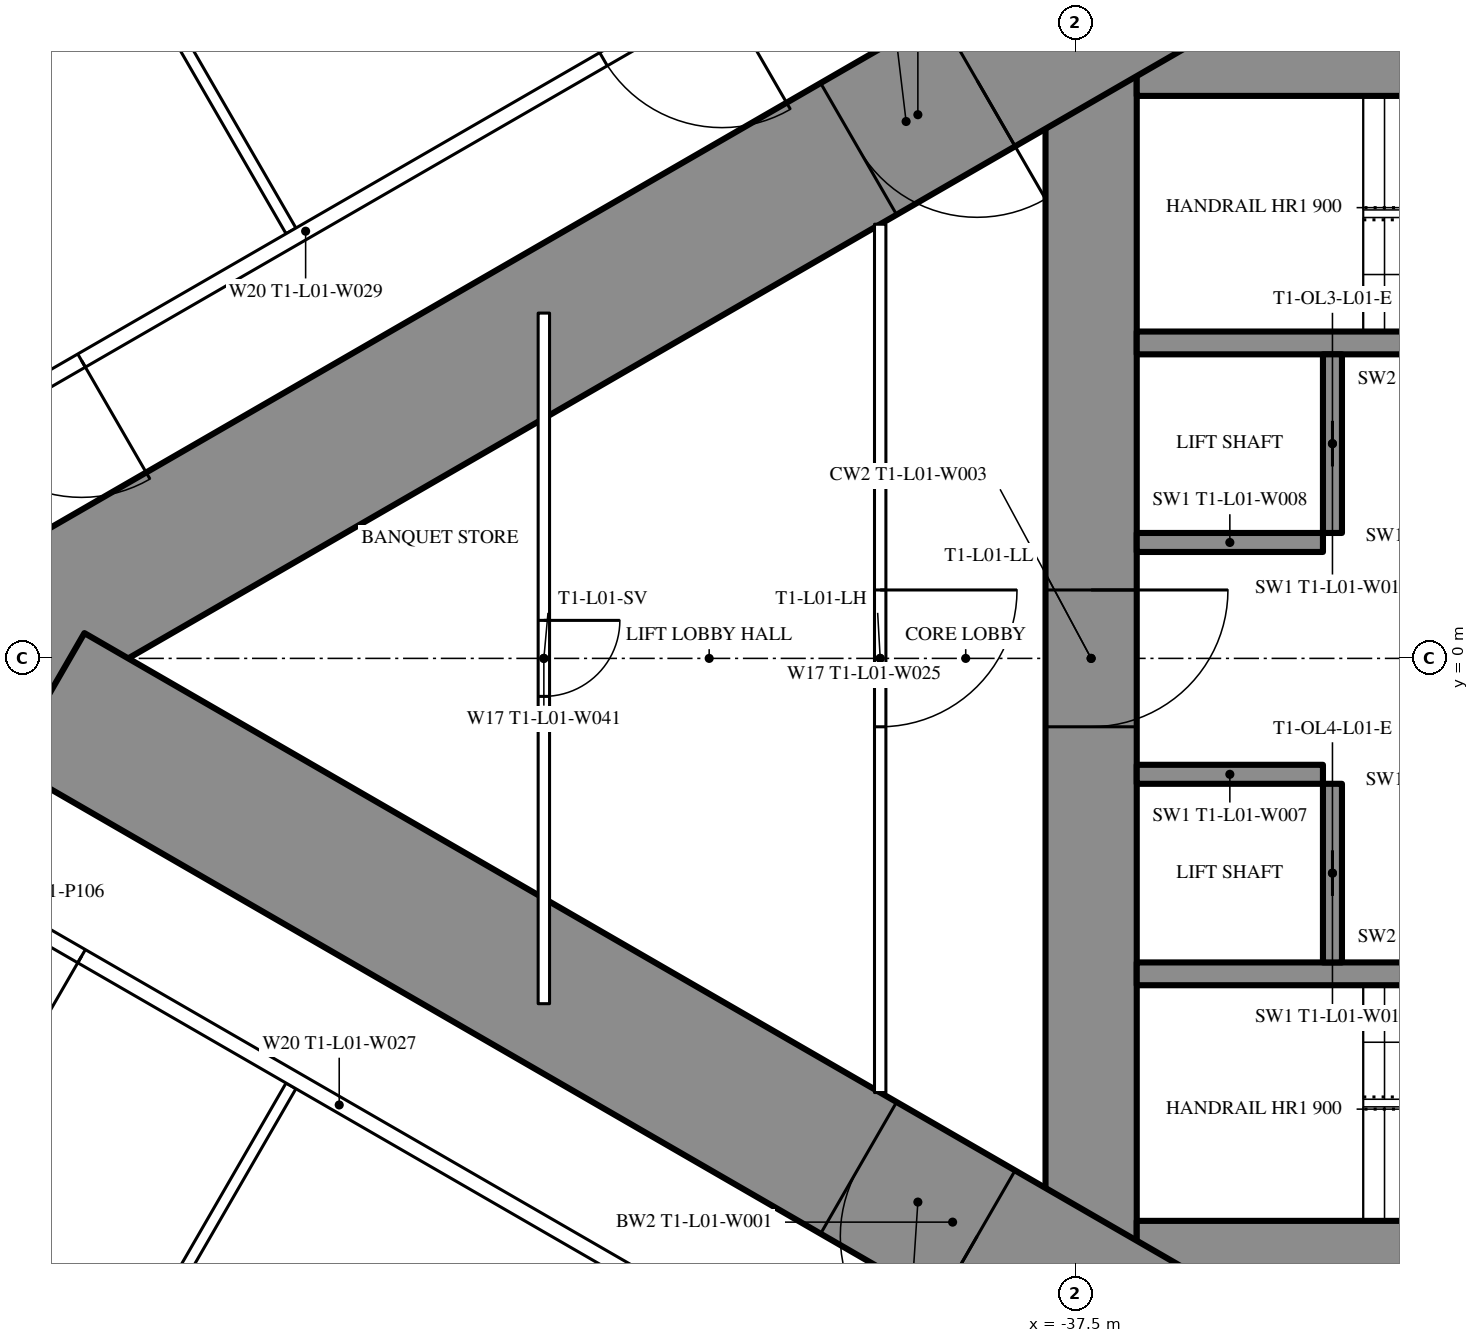
"""IFC4 building model, lengths in metres.
Left out: names, types, materials, properties, quantities, classifications, styles, units other than length and angle.
Written with IfcOpenShell. Run it as: python <this file> out.ifc"""

import sys

from ifc_helpers import new_model, si_unit, direction, frame, frame_2d, origin, place, context, subcontext, project, spatial, rectangle, extrude, element, fill, save


model = new_model("IFC4")
c1 = context("Model", 3, precision=1e-05, world=origin(), true_north=direction((0.0, 1.0)))
c2 = subcontext(c1, "Body", "Model", "MODEL_VIEW")
j1 = project(units=[si_unit("LENGTHUNIT", "METRE"), si_unit("PLANEANGLEUNIT", "RADIAN")], contexts=[c1])
p1 = place(None, origin())
s1 = spatial("IfcSite", under=j1, at=p1, CompositionType="ELEMENT")
p2 = place(p1, origin())
s2 = spatial("IfcBuilding", under=s1, at=p2, CompositionType="ELEMENT")
p3 = place(p2, frame((0.0, 0.0, 7.2)))
s3 = spatial("IfcBuildingStorey", under=s2, at=p3, CompositionType="ELEMENT", Elevation=7.2)
p4 = place(p3, frame((-37.3, 8.6, 0.0), z_axis=(0.0, 0.0, 1.0), x_axis=(0.0, -1.0, 0.0)))
e1 = element("IfcWall", 1, at=p4, inside=s3, PredefinedType="SHEAR", context=c2, shape_type="SweptSolid", body=[
    extrude(rectangle(XDim=17.2, YDim=1.2, at=frame_2d((8.6, 0.0))), origin(), (0.0, 0.0, 1.0), 5.4),
])
p5 = place(p4, frame((7.7, 0.0, 0.0)))
e2 = element("IfcOpeningElement", 2, at=p5, cuts=e1, PredefinedType="OPENING", context=c2, shape_type="SweptSolid", body=[
    extrude(rectangle(XDim=1.8, YDim=2.2, at=frame_2d((0.9, 1.1))), frame((0.0, 0.61, 0.0), z_axis=(0.0, -1.0, 0.0), x_axis=(1.0, 0.0, 0.0)), (0.0, 0.0, 1.0), 1.22),
])
p6 = place(p3, frame((-28.3, 8.0, 0.0), z_axis=(0.0, 0.0, 1.0), x_axis=(-1.0, 0.0, 0.0)))
e3 = element("IfcWall", 3, at=p6, inside=s3, PredefinedType="SHEAR", context=c2, shape_type="SweptSolid", body=[
    extrude(rectangle(XDim=8.4, YDim=1.2, at=frame_2d((4.2, 0.0))), origin(), (0.0, 0.0, 1.0), 5.4),
])
p7 = place(p6, frame((0.25, 0.0, 0.0)))
e4 = element("IfcOpeningElement", 4, at=p7, cuts=e3, PredefinedType="OPENING", context=c2, shape_type="SweptSolid", body=[
    extrude(rectangle(XDim=1.0, YDim=2.2, at=frame_2d((0.5, 1.1))), frame((0.0, 0.61, 0.0), z_axis=(0.0, -1.0, 0.0), x_axis=(1.0, 0.0, 0.0)), (0.0, 0.0, 1.0), 1.22),
])
p8 = place(p3, frame((-28.3, -8.0, 0.0), z_axis=(0.0, 0.0, 1.0), x_axis=(-1.0, 0.0, 0.0)))
e5 = element("IfcWall", 5, at=p8, inside=s3, PredefinedType="SHEAR", context=c2, shape_type="SweptSolid", body=[
    extrude(rectangle(XDim=8.4, YDim=1.2, at=frame_2d((4.2, 0.0))), origin(), (0.0, 0.0, 1.0), 5.4),
])
p9 = place(p8, frame((0.25, 0.0, 0.0)))
e6 = element("IfcOpeningElement", 6, at=p9, cuts=e5, PredefinedType="OPENING", context=c2, shape_type="SweptSolid", body=[
    extrude(rectangle(XDim=1.0, YDim=2.2, at=frame_2d((0.5, 1.1))), frame((0.0, 0.61, 0.0), z_axis=(0.0, -1.0, 0.0), x_axis=(1.0, 0.0, 0.0)), (0.0, 0.0, 1.0), 1.22),
])
for number, where, z_axis, x_axis in (
    (7, (-28.3, 4.15, 0.0), (0.0, 0.0, 1.0), (-1.0, 0.0, 0.0)),
    (8, (-28.3, -4.15, 0.0), (0.0, 0.0, 1.0), (-1.0, 0.0, 0.0)),
):
    element("IfcWall", number, at=place(p3, frame(where, z_axis=z_axis, x_axis=x_axis)), inside=s3, PredefinedType="SHEAR", context=c2, shape_type="SweptSolid", body=[
        extrude(rectangle(XDim=8.4, YDim=0.3, at=frame_2d((4.2, 0.0))), origin(), (0.0, 0.0, 1.0), 5.4),
    ])
p10 = place(p3, frame((-34.125, 4.0, 0.0), z_axis=(0.0, 0.0, 1.0), x_axis=(0.0, -1.0, 0.0)))
e9 = element("IfcWall", 9, at=p10, inside=s3, PredefinedType="SHEAR", context=c2, shape_type="SweptSolid", body=[
    extrude(rectangle(XDim=2.35, YDim=0.25, at=frame_2d((1.175, 0.0))), origin(), (0.0, 0.0, 1.0), 5.4),
])
p11 = place(p10, frame((0.875, 0.0, 0.0)))
e10 = element("IfcOpeningElement", 10, at=p11, cuts=e9, PredefinedType="OPENING", context=c2, shape_type="SweptSolid", body=[
    extrude(rectangle(XDim=0.6, YDim=2.0, at=frame_2d((0.3, 1.0))), frame((0.0, 0.135, 0.0), z_axis=(0.0, -1.0, 0.0), x_axis=(1.0, 0.0, 0.0)), (0.0, 0.0, 1.0), 0.27),
])
p12 = place(p3, frame((-34.25, 1.525, 0.0), z_axis=(0.0, 0.0, 1.0), x_axis=(-1.0, 0.0, 0.0)))
e11 = element("IfcWall", 11, at=p12, inside=s3, PredefinedType="SHEAR", context=c2, shape_type="SweptSolid", body=[
    extrude(rectangle(XDim=2.45, YDim=0.25, at=frame_2d((1.225, 0.0))), origin(), (0.0, 0.0, 1.0), 5.4),
])
p13 = place(p3, frame((-34.125, -1.65, 0.0), z_axis=(0.0, 0.0, 1.0), x_axis=(0.0, -1.0, 0.0)))
e12 = element("IfcWall", 12, at=p13, inside=s3, PredefinedType="SHEAR", context=c2, shape_type="SweptSolid", body=[
    extrude(rectangle(XDim=2.35, YDim=0.25, at=frame_2d((1.175, 0.0))), origin(), (0.0, 0.0, 1.0), 5.4),
])
p14 = place(p13, frame((0.875, 0.0, 0.0)))
e13 = element("IfcOpeningElement", 13, at=p14, cuts=e12, PredefinedType="OPENING", context=c2, shape_type="SweptSolid", body=[
    extrude(rectangle(XDim=0.6, YDim=2.0, at=frame_2d((0.3, 1.0))), frame((0.0, 0.135, 0.0), z_axis=(0.0, -1.0, 0.0), x_axis=(1.0, 0.0, 0.0)), (0.0, 0.0, 1.0), 0.27),
])
p15 = place(p3, frame((-34.25, -1.525, 0.0), z_axis=(0.0, 0.0, 1.0), x_axis=(-1.0, 0.0, 0.0)))
e14 = element("IfcWall", 14, at=p15, inside=s3, PredefinedType="SHEAR", context=c2, shape_type="SweptSolid", body=[
    extrude(rectangle(XDim=2.45, YDim=0.25, at=frame_2d((1.225, 0.0))), origin(), (0.0, 0.0, 1.0), 5.4),
])
p16 = place(p3, frame((-27.2, 14.3, 0.0), z_axis=(0.0, 0.0, 1.0), x_axis=(-0.866026593062, -0.499997940104, 0.0)))
e15 = element("IfcWall", 15, at=p16, inside=s3, PredefinedType="SHEAR", context=c2, shape_type="SweptSolid", body=[
    extrude(rectangle(XDim=28.946, YDim=2.0, at=frame_2d((14.473, 0.0))), origin(), (0.0, 0.0, 1.0), 5.4),
])
p17 = place(p16, frame((4.6, 0.0, 0.0)))
e16 = element("IfcOpeningElement", 16, at=p17, cuts=e15, PredefinedType="OPENING", context=c2, shape_type="SweptSolid", body=[
    extrude(rectangle(XDim=1.0, YDim=2.2, at=frame_2d((0.5, 1.1))), frame((0.0, 1.01, 0.0), z_axis=(0.0, -1.0, 0.0), x_axis=(1.0, 0.0, 0.0)), (0.0, 0.0, 1.0), 2.02),
])
p18 = place(p16, frame((13.395, 0.0, 0.0)))
e17 = element("IfcOpeningElement", 17, at=p18, cuts=e15, PredefinedType="OPENING", context=c2, shape_type="SweptSolid", body=[
    extrude(rectangle(XDim=1.8, YDim=2.2, at=frame_2d((0.9, 1.1))), frame((0.0, 1.01, 0.0), z_axis=(0.0, -1.0, 0.0), x_axis=(1.0, 0.0, 0.0)), (0.0, 0.0, 1.0), 2.02),
])
p19 = place(p3, frame((-27.2, -14.3, 0.0), z_axis=(0.0, 0.0, 1.0), x_axis=(-0.866024044937, 0.500002353585, 0.0)))
e18 = element("IfcWall", 18, at=p19, inside=s3, PredefinedType="SHEAR", context=c2, shape_type="SweptSolid", body=[
    extrude(rectangle(XDim=27.533, YDim=2.0, at=frame_2d((13.767, 0.0))), origin(), (0.0, 0.0, 1.0), 5.4),
])
p20 = place(p19, frame((4.6, 0.0, 0.0)))
e19 = element("IfcOpeningElement", 19, at=p20, cuts=e18, PredefinedType="OPENING", context=c2, shape_type="SweptSolid", body=[
    extrude(rectangle(XDim=1.0, YDim=2.2, at=frame_2d((0.5, 1.1))), frame((0.0, 1.01, 0.0), z_axis=(0.0, -1.0, 0.0), x_axis=(1.0, 0.0, 0.0)), (0.0, 0.0, 1.0), 2.02),
])
p21 = place(p19, frame((13.395, 0.0, 0.0)))
e20 = element("IfcOpeningElement", 20, at=p21, cuts=e18, PredefinedType="OPENING", context=c2, shape_type="SweptSolid", body=[
    extrude(rectangle(XDim=1.8, YDim=2.2, at=frame_2d((0.9, 1.1))), frame((0.0, 1.01, 0.0), z_axis=(0.0, -1.0, 0.0), x_axis=(1.0, 0.0, 0.0)), (0.0, 0.0, 1.0), 2.02),
])
for number, where, z_axis, x_axis in (
    (21, (-47.827, 5.624, 0.0), (0.0, 0.0, 1.0), (-0.5, 0.866, 0.0)),
    (22, (-47.827, -5.624, 0.0), (0.0, 0.0, 1.0), (-0.5, -0.866, 0.0)),
):
    element("IfcWall", number, at=place(p3, frame(where, z_axis=z_axis, x_axis=x_axis)), inside=s3, PredefinedType="PARTITIONING", context=c2, shape_type="SweptSolid", body=[
        extrude(rectangle(XDim=9.11, YDim=0.15, at=frame_2d((4.555, 0.0))), origin(), (0.0, 0.0, 1.0), 4.05),
    ])
p22 = place(p3, frame((-37.9, 11.24, 0.0), z_axis=(0.0, 0.0, 1.0), x_axis=(-0.866022995118, -0.50000417191, 0.0)))
e23 = element("IfcWall", 23, at=p22, inside=s3, PredefinedType="PARTITIONING", context=c2, shape_type="SweptSolid", body=[
    extrude(rectangle(XDim=22.48, YDim=0.2, at=frame_2d((11.24, 0.0))), origin(), (0.0, 0.0, 1.0), 5.05),
])
p23 = place(p22, frame((14.644, 0.0, 0.0)))
e24 = element("IfcOpeningElement", 24, at=p23, cuts=e23, PredefinedType="OPENING", context=c2, shape_type="SweptSolid", body=[
    extrude(rectangle(XDim=1.8, YDim=2.2, at=frame_2d((0.9, 1.1))), frame((0.0, 0.11, 0.0), z_axis=(0.0, -1.0, 0.0), x_axis=(1.0, 0.0, 0.0)), (0.0, 0.0, 1.0), 0.22),
])
p24 = place(p22, frame((20.069, 0.0, 0.0)))
e25 = element("IfcOpeningElement", 25, at=p24, cuts=e23, PredefinedType="OPENING", context=c2, shape_type="SweptSolid", body=[
    extrude(rectangle(XDim=1.8, YDim=2.2, at=frame_2d((0.9, 1.1))), frame((0.0, 0.11, 0.0), z_axis=(0.0, -1.0, 0.0), x_axis=(1.0, 0.0, 0.0)), (0.0, 0.0, 1.0), 0.22),
])
p25 = place(p22, frame((4.915, 0.0, 0.0)))
e26 = element("IfcOpeningElement", 26, at=p25, cuts=e23, PredefinedType="OPENING", context=c2, shape_type="SweptSolid", body=[
    extrude(rectangle(XDim=1.8, YDim=2.2, at=frame_2d((0.9, 1.1))), frame((0.0, 0.11, 0.0), z_axis=(0.0, -1.0, 0.0), x_axis=(1.0, 0.0, 0.0)), (0.0, 0.0, 1.0), 0.22),
])
p26 = place(p3, frame((-37.12, -11.69, 0.0), z_axis=(0.0, 0.0, 1.0), x_axis=(-0.866028803602, 0.499994111297, 0.0)))
e27 = element("IfcWall", 27, at=p26, inside=s3, PredefinedType="PARTITIONING", context=c2, shape_type="SweptSolid", body=[
    extrude(rectangle(XDim=23.26, YDim=0.2, at=frame_2d((11.63, 0.0))), origin(), (0.0, 0.0, 1.0), 5.05),
])
p27 = place(p26, frame((20.909, 0.0, 0.0)))
e28 = element("IfcOpeningElement", 28, at=p27, cuts=e27, PredefinedType="OPENING", context=c2, shape_type="SweptSolid", body=[
    extrude(rectangle(XDim=1.8, YDim=2.2, at=frame_2d((0.9, 1.1))), frame((0.0, 0.11, 0.0), z_axis=(0.0, -1.0, 0.0), x_axis=(1.0, 0.0, 0.0)), (0.0, 0.0, 1.0), 0.22),
])
p28 = place(p26, frame((15.544, 0.0, 0.0)))
e29 = element("IfcOpeningElement", 29, at=p28, cuts=e27, PredefinedType="OPENING", context=c2, shape_type="SweptSolid", body=[
    extrude(rectangle(XDim=1.8, YDim=2.2, at=frame_2d((0.9, 1.1))), frame((0.0, 0.11, 0.0), z_axis=(0.0, -1.0, 0.0), x_axis=(1.0, 0.0, 0.0)), (0.0, 0.0, 1.0), 0.22),
])
p29 = place(p26, frame((5.365, 0.0, 0.0)))
e30 = element("IfcOpeningElement", 30, at=p29, cuts=e27, PredefinedType="OPENING", context=c2, shape_type="SweptSolid", body=[
    extrude(rectangle(XDim=1.8, YDim=2.2, at=frame_2d((0.9, 1.1))), frame((0.0, 0.11, 0.0), z_axis=(0.0, -1.0, 0.0), x_axis=(1.0, 0.0, 0.0)), (0.0, 0.0, 1.0), 0.22),
])
p30 = place(p3, frame((-40.075, 5.712, 0.0), z_axis=(0.0, 0.0, 1.0), x_axis=(0.0, -1.0, 0.0)))
e31 = element("IfcWall", 31, at=p30, inside=s3, PredefinedType="PARTITIONING", context=c2, shape_type="SweptSolid", body=[
    extrude(rectangle(XDim=11.424, YDim=0.15, at=frame_2d((5.712, 0.0))), origin(), (0.0, 0.0, 1.0), 5.05),
])
p31 = place(p30, frame((4.812, 0.0, 0.0)))
e32 = element("IfcOpeningElement", 32, at=p31, cuts=e31, PredefinedType="OPENING", context=c2, shape_type="SweptSolid", body=[
    extrude(rectangle(XDim=1.8, YDim=2.2, at=frame_2d((0.9, 1.1))), frame((0.0, 0.085, 0.0), z_axis=(0.0, -1.0, 0.0), x_axis=(1.0, 0.0, 0.0)), (0.0, 0.0, 1.0), 0.17),
])
p32 = place(p3, frame((-44.5, 4.543, 0.0), z_axis=(0.0, 0.0, 1.0), x_axis=(0.0, -1.0, 0.0)))
e33 = element("IfcWall", 33, at=p32, inside=s3, PredefinedType="PARTITIONING", context=c2, shape_type="SweptSolid", body=[
    extrude(rectangle(XDim=9.085, YDim=0.15, at=frame_2d((4.543, 0.0))), origin(), (0.0, 0.0, 1.0), 5.05),
])
p33 = place(p32, frame((4.043, 0.0, 0.0)))
e34 = element("IfcOpeningElement", 34, at=p33, cuts=e33, PredefinedType="OPENING", context=c2, shape_type="SweptSolid", body=[
    extrude(rectangle(XDim=1.0, YDim=2.2, at=frame_2d((0.5, 1.1))), frame((0.0, 0.085, 0.0), z_axis=(0.0, -1.0, 0.0), x_axis=(1.0, 0.0, 0.0)), (0.0, 0.0, 1.0), 0.17),
])
p34 = place(p23, origin())
e35 = element("IfcDoor", 35, at=p34, inside=s3, OperationType="DOUBLE_DOOR_SINGLE_SWING", PredefinedType="DOOR", context=c2, shape_type="SweptSolid", body=[
    extrude(rectangle(XDim=1.8, YDim=2.2, at=frame_2d((0.9, 1.1))), frame((0.0, 0.025, 0.0), z_axis=(0.0, -1.0, 0.0), x_axis=(1.0, 0.0, 0.0)), (0.0, 0.0, 1.0), 0.05),
])
fill(e24, e35)
p35 = place(p28, origin())
e36 = element("IfcDoor", 36, at=p35, inside=s3, OperationType="DOUBLE_DOOR_SINGLE_SWING", PredefinedType="DOOR", context=c2, shape_type="SweptSolid", body=[
    extrude(rectangle(XDim=1.8, YDim=2.2, at=frame_2d((0.9, 1.1))), frame((0.0, 0.025, 0.0), z_axis=(0.0, -1.0, 0.0), x_axis=(1.0, 0.0, 0.0)), (0.0, 0.0, 1.0), 0.05),
])
fill(e29, e36)
p36 = place(p25, origin())
e37 = element("IfcDoor", 37, at=p36, inside=s3, OperationType="DOUBLE_DOOR_SINGLE_SWING", PredefinedType="DOOR", context=c2, shape_type="SweptSolid", body=[
    extrude(rectangle(XDim=1.8, YDim=2.2, at=frame_2d((0.9, 1.1))), frame((0.0, 0.025, 0.0), z_axis=(0.0, -1.0, 0.0), x_axis=(1.0, 0.0, 0.0)), (0.0, 0.0, 1.0), 0.05),
])
fill(e26, e37)
p37 = place(p31, origin())
e38 = element("IfcDoor", 38, at=p37, inside=s3, OperationType="DOUBLE_DOOR_SINGLE_SWING", PredefinedType="DOOR", context=c2, shape_type="SweptSolid", body=[
    extrude(rectangle(XDim=1.8, YDim=2.2, at=frame_2d((0.9, 1.1))), frame((0.0, 0.025, 0.0), z_axis=(0.0, -1.0, 0.0), x_axis=(1.0, 0.0, 0.0)), (0.0, 0.0, 1.0), 0.05),
])
fill(e32, e38)
p38 = place(p33, origin())
e39 = element("IfcDoor", 39, at=p38, inside=s3, OperationType="SINGLE_SWING_LEFT", PredefinedType="DOOR", context=c2, shape_type="SweptSolid", body=[
    extrude(rectangle(XDim=1.0, YDim=2.2, at=frame_2d((0.5, 1.1))), frame((0.0, 0.025, 0.0), z_axis=(0.0, -1.0, 0.0), x_axis=(1.0, 0.0, 0.0)), (0.0, 0.0, 1.0), 0.05),
])
fill(e34, e39)
p39 = place(p18, origin())
e40 = element("IfcDoor", 40, at=p39, inside=s3, OperationType="DOUBLE_DOOR_SINGLE_SWING", PredefinedType="DOOR", context=c2, shape_type="SweptSolid", body=[
    extrude(rectangle(XDim=1.8, YDim=2.2, at=frame_2d((0.9, 1.1))), frame((0.0, 0.025, 0.0), z_axis=(0.0, -1.0, 0.0), x_axis=(1.0, 0.0, 0.0)), (0.0, 0.0, 1.0), 0.05),
])
fill(e17, e40)
p40 = place(p21, origin())
e41 = element("IfcDoor", 41, at=p40, inside=s3, OperationType="DOUBLE_DOOR_SINGLE_SWING", PredefinedType="DOOR", context=c2, shape_type="SweptSolid", body=[
    extrude(rectangle(XDim=1.8, YDim=2.2, at=frame_2d((0.9, 1.1))), frame((0.0, 0.025, 0.0), z_axis=(0.0, -1.0, 0.0), x_axis=(1.0, 0.0, 0.0)), (0.0, 0.0, 1.0), 0.05),
])
fill(e20, e41)
p41 = place(p5, origin())
e42 = element("IfcDoor", 42, at=p41, inside=s3, OperationType="DOUBLE_DOOR_SINGLE_SWING", PredefinedType="DOOR", context=c2, shape_type="SweptSolid", body=[
    extrude(rectangle(XDim=1.8, YDim=2.2, at=frame_2d((0.9, 1.1))), frame((0.0, 0.025, 0.0), z_axis=(0.0, -1.0, 0.0), x_axis=(1.0, 0.0, 0.0)), (0.0, 0.0, 1.0), 0.05),
])
fill(e2, e42)
p42 = place(p11, origin())
e43 = element("IfcDoor", 43, at=p42, inside=s3, OperationType="SLIDING_TO_LEFT", PredefinedType="DOOR", context=c2, shape_type="SweptSolid", body=[
    extrude(rectangle(XDim=0.6, YDim=2.0, at=frame_2d((0.3, 1.0))), frame((0.0, 0.025, 0.0), z_axis=(0.0, -1.0, 0.0), x_axis=(1.0, 0.0, 0.0)), (0.0, 0.0, 1.0), 0.05),
])
fill(e10, e43)
p43 = place(p14, origin())
e44 = element("IfcDoor", 44, at=p43, inside=s3, OperationType="SLIDING_TO_LEFT", PredefinedType="DOOR", context=c2, shape_type="SweptSolid", body=[
    extrude(rectangle(XDim=0.6, YDim=2.0, at=frame_2d((0.3, 1.0))), frame((0.0, 0.025, 0.0), z_axis=(0.0, -1.0, 0.0), x_axis=(1.0, 0.0, 0.0)), (0.0, 0.0, 1.0), 0.05),
])
fill(e13, e44)
save(model, sys.argv[1])
